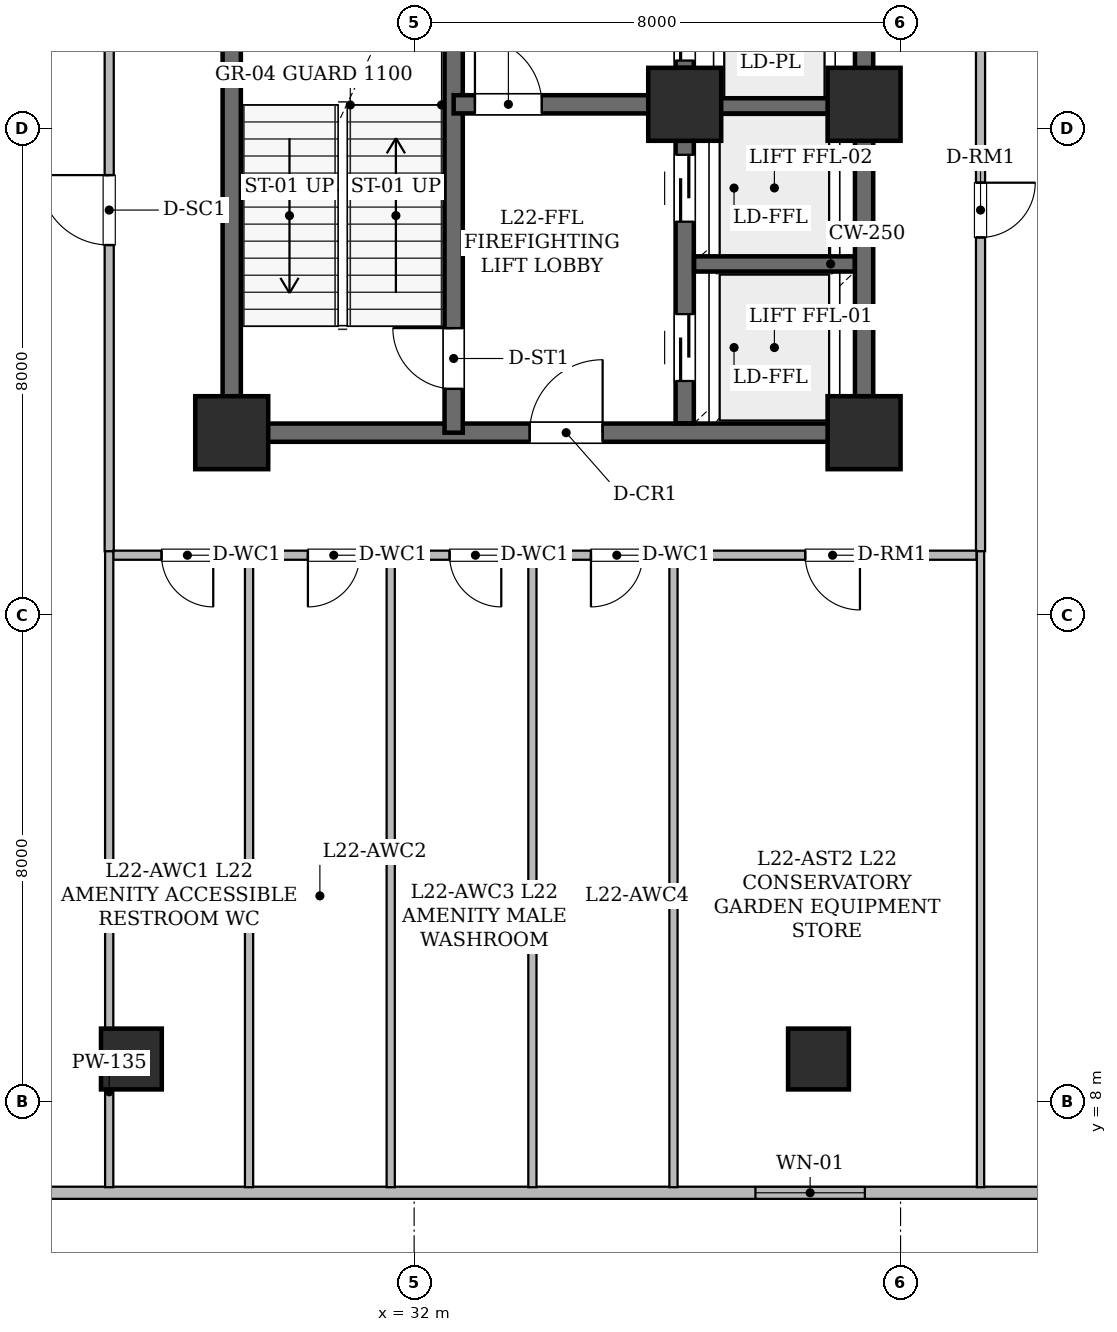
"""IFC4 building model, lengths in metres.
Left out: names, types, materials, properties, quantities, classifications, styles, units other than length and angle.
Written with IfcOpenShell. Run it as: python <this file> out.ifc"""

import sys

from ifc_helpers import new_model, si_unit, direction, frame, frame_2d, origin, origin_2d, place, context, subcontext, project, spatial, rectangle, hollow_rectangle, extrude, element, fill, save


model = new_model("IFC4")
c1 = context("Model", 3, precision=1e-05, world=origin(), true_north=direction((0.0, 1.0)))
c2 = subcontext(c1, "Body", "Model", "MODEL_VIEW")
j1 = project(units=[si_unit("LENGTHUNIT", "METRE"), si_unit("PLANEANGLEUNIT", "RADIAN")], contexts=[c1])
p1 = place(None, origin())
s1 = spatial("IfcSite", under=j1, at=p1, CompositionType="ELEMENT")
p2 = place(p1, origin())
s2 = spatial("IfcBuilding", under=s1, at=p2, CompositionType="ELEMENT")
p3 = place(p2, frame((0.0, 0.0, 89.8)))
s3 = spatial("IfcBuildingStorey", under=s2, at=p3, CompositionType="ELEMENT", Elevation=89.8)
for number, where, z_axis, x_axis in (
    (1, (29.0, 19.0, 0.0), (0.0, 0.0, 1.0), (1.0, 0.0, 0.0)),
    (2, (39.4, 19.0, 0.0), (0.0, 0.0, 1.0), (1.0, 0.0, 0.0)),
    (3, (36.45, 24.4, 0.0), (0.0, 0.0, 1.0), (1.0, 0.0, 0.0)),
    (4, (39.4, 24.4, 0.0), (0.0, 0.0, 1.0), (1.0, 0.0, 0.0)),
):
    element("IfcColumn", number, at=place(p3, frame(where, z_axis=z_axis, x_axis=x_axis)), inside=s3, PredefinedType="COLUMN", context=c2, shape_type="SweptSolid", body=[
        extrude(hollow_rectangle(XDim=1.2, YDim=1.2, WallThickness=0.06, at=origin_2d()), origin(), (0.0, 0.0, 1.0), 4.8),
    ])
for number, where, z_axis, x_axis in (
    (5, (27.35, 8.7, 0.025), (0.0, 0.0, 1.0), (1.0, 0.0, 0.0)),
    (6, (38.65, 8.7, 0.025), (0.0, 0.0, 1.0), (1.0, 0.0, 0.0)),
):
    element("IfcColumn", number, at=place(p3, frame(where, z_axis=z_axis, x_axis=x_axis)), inside=s3, PredefinedType="COLUMN", context=c2, shape_type="SweptSolid", body=[
        extrude(hollow_rectangle(XDim=1.0, YDim=1.0, WallThickness=0.05, at=origin_2d()), origin(), (0.0, 0.0, 1.0), 4.775),
    ])
p4 = place(p3, frame((52.296, 6.5, 0.0), z_axis=(0.0, 0.0, 1.0), x_axis=(-1.0, 0.0, 0.0)))
e7 = element("IfcWall", 7, at=p4, inside=s3, PredefinedType="STANDARD", context=c2, shape_type="SweptSolid", body=[
    extrude(rectangle(XDim=38.593, YDim=0.2, at=frame_2d((19.296, 0.0))), origin(), (0.0, 0.0, 1.0), 4.58),
])
p5 = place(p4, frame((12.883, 0.0, 0.9)))
e8 = element("IfcOpeningElement", 8, at=p5, cuts=e7, PredefinedType="OPENING", context=c2, shape_type="SweptSolid", body=[
    extrude(rectangle(XDim=1.8, YDim=1.6, at=frame_2d((0.9, 0.8))), frame((0.0, 0.11, 0.0), z_axis=(0.0, -1.0, 0.0), x_axis=(1.0, 0.0, 0.0)), (0.0, 0.0, 1.0), 0.22),
])
p6 = place(p3, frame((29.0, 19.0, 0.0), z_axis=(0.0, 0.0, 1.0), x_axis=(0.0, 1.0, 0.0)))
e9 = element("IfcWall", 9, at=p6, inside=s3, PredefinedType="SHEAR", context=c2, shape_type="SweptSolid", body=[
    extrude(rectangle(XDim=9.0, YDim=0.3, at=frame_2d((4.5, 0.0))), origin(), (0.0, 0.0, 1.0), 4.58),
])
p7 = place(p3, frame((29.0, 19.0, 0.0), z_axis=(0.0, 0.0, 1.0), x_axis=(1.0, 0.0, 0.0)))
e10 = element("IfcWall", 10, at=p7, inside=s3, PredefinedType="SHEAR", context=c2, shape_type="SweptSolid", body=[
    extrude(rectangle(XDim=10.4, YDim=0.3, at=frame_2d((5.2, 0.0))), origin(), (0.0, 0.0, 1.0), 4.58),
])
p8 = place(p7, frame((4.9, 0.0, 0.0)))
e11 = element("IfcOpeningElement", 11, at=p8, cuts=e10, PredefinedType="OPENING", context=c2, shape_type="SweptSolid", body=[
    extrude(rectangle(XDim=1.2, YDim=2.15, at=frame_2d((0.6, 1.075))), frame((0.0, 0.16, 0.0), z_axis=(0.0, -1.0, 0.0), x_axis=(1.0, 0.0, 0.0)), (0.0, 0.0, 1.0), 0.32),
])
p9 = place(p3, frame((39.4, 19.0, 0.0), z_axis=(0.0, 0.0, 1.0), x_axis=(0.0, 1.0, 0.0)))
e12 = element("IfcWall", 12, at=p9, inside=s3, PredefinedType="SHEAR", context=c2, shape_type="SweptSolid", body=[
    extrude(rectangle(XDim=5.4, YDim=0.3, at=frame_2d((2.7, 0.0))), origin(), (0.0, 0.0, 1.0), 4.58),
])
p10 = place(p3, frame((39.4, 24.4, 0.0), z_axis=(0.0, 0.0, 1.0), x_axis=(0.0, 1.0, 0.0)))
e13 = element("IfcWall", 13, at=p10, inside=s3, PredefinedType="SHEAR", context=c2, shape_type="SweptSolid", body=[
    extrude(rectangle(XDim=12.6, YDim=0.3, at=frame_2d((6.3, 0.0))), origin(), (0.0, 0.0, 1.0), 4.58),
])
p11 = place(p3, frame((32.65, 19.0, 0.0), z_axis=(0.0, 0.0, 1.0), x_axis=(0.0, 1.0, 0.0)))
e14 = element("IfcWall", 14, at=p11, inside=s3, PredefinedType="SHEAR", context=c2, shape_type="SweptSolid", body=[
    extrude(rectangle(XDim=9.0, YDim=0.3, at=frame_2d((4.5, 0.0))), origin(), (0.0, 0.0, 1.0), 4.58),
])
p12 = place(p11, frame((0.72, 0.0, 0.0)))
e15 = element("IfcOpeningElement", 15, at=p12, cuts=e14, PredefinedType="OPENING", context=c2, shape_type="SweptSolid", body=[
    extrude(rectangle(XDim=1.0, YDim=2.15, at=frame_2d((0.5, 1.075))), frame((0.0, 0.16, 0.0), z_axis=(0.0, -1.0, 0.0), x_axis=(1.0, 0.0, 0.0)), (0.0, 0.0, 1.0), 0.32),
])
p13 = place(p3, frame((32.65, 24.4, 0.0), z_axis=(0.0, 0.0, 1.0), x_axis=(1.0, 0.0, 0.0)))
e16 = element("IfcWall", 16, at=p13, inside=s3, PredefinedType="SHEAR", context=c2, shape_type="SweptSolid", body=[
    extrude(rectangle(XDim=3.8, YDim=0.3, at=frame_2d((1.9, 0.0))), origin(), (0.0, 0.0, 1.0), 4.58),
])
p14 = place(p13, frame((0.35, 0.0, 0.0)))
e17 = element("IfcOpeningElement", 17, at=p14, cuts=e16, PredefinedType="OPENING", context=c2, shape_type="SweptSolid", body=[
    extrude(rectangle(XDim=1.1, YDim=2.15, at=frame_2d((0.55, 1.075))), frame((0.0, 0.16, 0.0), z_axis=(0.0, -1.0, 0.0), x_axis=(1.0, 0.0, 0.0)), (0.0, 0.0, 1.0), 0.32),
])
p15 = place(p3, frame((36.45, 19.154, 0.0), z_axis=(0.0, 0.0, 1.0), x_axis=(0.0, 1.0, 0.0)))
e18 = element("IfcWall", 18, at=p15, inside=s3, PredefinedType="SHEAR", context=c2, shape_type="SweptSolid", body=[
    extrude(rectangle(XDim=4.646, YDim=0.3, at=frame_2d((2.323, 0.0))), origin(), (0.0, 0.0, 1.0), 4.58),
])
p16 = place(p15, frame((0.696, 0.0, 0.0)))
e19 = element("IfcOpeningElement", 19, at=p16, cuts=e18, PredefinedType="OPENING", context=c2, shape_type="SweptSolid", body=[
    extrude(rectangle(XDim=1.1, YDim=2.15, at=frame_2d((0.55, 1.075))), frame((0.0, 0.16, 0.0), z_axis=(0.0, -1.0, 0.0), x_axis=(1.0, 0.0, 0.0)), (0.0, 0.0, 1.0), 0.32),
])
p17 = place(p15, frame((3.316, 0.0, 0.0)))
e20 = element("IfcOpeningElement", 20, at=p17, cuts=e18, PredefinedType="OPENING", context=c2, shape_type="SweptSolid", body=[
    extrude(rectangle(XDim=1.1, YDim=2.15, at=frame_2d((0.55, 1.075))), frame((0.0, 0.16, 0.0), z_axis=(0.0, -1.0, 0.0), x_axis=(1.0, 0.0, 0.0)), (0.0, 0.0, 1.0), 0.32),
])
p18 = place(p3, frame((36.45, 25.0, 0.0), z_axis=(0.0, 0.0, 1.0), x_axis=(0.0, 1.0, 0.0)))
e21 = element("IfcWall", 21, at=p18, inside=s3, PredefinedType="SHEAR", context=c2, shape_type="SweptSolid", body=[
    extrude(rectangle(XDim=5.15, YDim=0.3, at=frame_2d((2.575, 0.0))), origin(), (0.0, 0.0, 1.0), 4.58),
])
p19 = place(p18, frame((0.12, 0.0, 0.0)))
e22 = element("IfcOpeningElement", 22, at=p19, cuts=e21, PredefinedType="OPENING", context=c2, shape_type="SweptSolid", body=[
    extrude(rectangle(XDim=1.05, YDim=2.15, at=frame_2d((0.525, 1.075))), frame((0.0, 0.16, 0.0), z_axis=(0.0, -1.0, 0.0), x_axis=(1.0, 0.0, 0.0)), (0.0, 0.0, 1.0), 0.32),
])
p20 = place(p18, frame((2.095, 0.0, 0.0)))
e23 = element("IfcOpeningElement", 23, at=p20, cuts=e21, PredefinedType="OPENING", context=c2, shape_type="SweptSolid", body=[
    extrude(rectangle(XDim=1.05, YDim=2.15, at=frame_2d((0.525, 1.075))), frame((0.0, 0.16, 0.0), z_axis=(0.0, -1.0, 0.0), x_axis=(1.0, 0.0, 0.0)), (0.0, 0.0, 1.0), 0.32),
])
p21 = place(p18, frame((3.98, 0.0, 0.0)))
e24 = element("IfcOpeningElement", 24, at=p21, cuts=e21, PredefinedType="OPENING", context=c2, shape_type="SweptSolid", body=[
    extrude(rectangle(XDim=1.05, YDim=2.15, at=frame_2d((0.525, 1.075))), frame((0.0, 0.16, 0.0), z_axis=(0.0, -1.0, 0.0), x_axis=(1.0, 0.0, 0.0)), (0.0, 0.0, 1.0), 0.32),
])
for number, where, z_axis, x_axis in (
    (25, (36.604, 21.775, 0.0), (0.0, 0.0, 1.0), (1.0, 0.0, 0.0)),
    (26, (36.604, 24.375, 0.0), (0.0, 0.0, 1.0), (1.0, 0.0, 0.0)),
):
    element("IfcWall", number, at=place(p3, frame(where, z_axis=z_axis, x_axis=x_axis)), inside=s3, PredefinedType="SHEAR", context=c2, shape_type="SweptSolid", body=[
        extrude(rectangle(XDim=2.642, YDim=0.25, at=frame_2d((1.321, 0.0))), origin(), (0.0, 0.0, 1.0), 4.58),
    ])
p22 = place(p3, frame((41.315, 28.314, 0.0), z_axis=(0.0, 0.0, 1.0), x_axis=(0.0, -1.0, 0.0)))
e27 = element("IfcWall", 27, at=p22, inside=s3, PredefinedType="STANDARD", context=c2, shape_type="SweptSolid", body=[
    extrude(rectangle(XDim=11.264, YDim=0.15, at=frame_2d((5.632, 0.0))), origin(), (0.0, 0.0, 1.0), 3.797),
])
p23 = place(p22, frame((5.203, 0.0, 0.0)))
e28 = element("IfcOpeningElement", 28, at=p23, cuts=e27, PredefinedType="OPENING", context=c2, shape_type="SweptSolid", body=[
    extrude(rectangle(XDim=0.9, YDim=2.1, at=frame_2d((0.45, 1.05))), frame((0.0, 0.085, 0.0), z_axis=(0.0, -1.0, 0.0), x_axis=(1.0, 0.0, 0.0)), (0.0, 0.0, 1.0), 0.17),
])
p24 = place(p3, frame((26.985, 17.05, 0.0), z_axis=(0.0, 0.0, 1.0), x_axis=(0.0, 1.0, 0.0)))
e29 = element("IfcWall", 29, at=p24, inside=s3, PredefinedType="STANDARD", context=c2, shape_type="SweptSolid", body=[
    extrude(rectangle(XDim=11.264, YDim=0.15, at=frame_2d((5.632, 0.0))), origin(), (0.0, 0.0, 1.0), 3.797),
])
p25 = place(p24, frame((5.036, 0.0, 0.0)))
e30 = element("IfcOpeningElement", 30, at=p25, cuts=e29, PredefinedType="OPENING", context=c2, shape_type="SweptSolid", body=[
    extrude(rectangle(XDim=1.15, YDim=2.2, at=frame_2d((0.575, 1.1))), frame((0.0, 0.085, 0.0), z_axis=(0.0, -1.0, 0.0), x_axis=(1.0, 0.0, 0.0)), (0.0, 0.0, 1.0), 0.17),
])
p26 = place(p3, frame((29.534, 16.985, 0.0), z_axis=(0.0, 0.0, 1.0), x_axis=(-1.0, 0.0, 0.0)))
e31 = element("IfcWall", 31, at=p26, inside=s3, PredefinedType="STANDARD", context=c2, shape_type="SweptSolid", body=[
    extrude(rectangle(XDim=2.484, YDim=0.15, at=frame_2d((1.242, 0.0))), origin(), (0.0, 0.0, 1.0), 3.797),
])
p27 = place(p26, frame((0.838, 0.0, 0.0)))
e32 = element("IfcOpeningElement", 32, at=p27, cuts=e31, PredefinedType="OPENING", context=c2, shape_type="SweptSolid", body=[
    extrude(rectangle(XDim=0.85, YDim=2.1, at=frame_2d((0.425, 1.05))), frame((0.0, 0.085, 0.0), z_axis=(0.0, -1.0, 0.0), x_axis=(1.0, 0.0, 0.0)), (0.0, 0.0, 1.0), 0.17),
])
p28 = place(p3, frame((31.864, 16.985, 0.0), z_axis=(0.0, 0.0, 1.0), x_axis=(-1.0, 0.0, 0.0)))
e33 = element("IfcWall", 33, at=p28, inside=s3, PredefinedType="STANDARD", context=c2, shape_type="SweptSolid", body=[
    extrude(rectangle(XDim=2.33, YDim=0.15, at=frame_2d((1.165, 0.0))), origin(), (0.0, 0.0, 1.0), 4.58),
])
p29 = place(p28, frame((0.761, 0.0, 0.0)))
e34 = element("IfcOpeningElement", 34, at=p29, cuts=e33, PredefinedType="OPENING", context=c2, shape_type="SweptSolid", body=[
    extrude(rectangle(XDim=0.85, YDim=2.1, at=frame_2d((0.425, 1.05))), frame((0.0, 0.085, 0.0), z_axis=(0.0, -1.0, 0.0), x_axis=(1.0, 0.0, 0.0)), (0.0, 0.0, 1.0), 0.17),
])
p30 = place(p3, frame((34.194, 16.985, 0.0), z_axis=(0.0, 0.0, 1.0), x_axis=(-1.0, 0.0, 0.0)))
e35 = element("IfcWall", 35, at=p30, inside=s3, PredefinedType="STANDARD", context=c2, shape_type="SweptSolid", body=[
    extrude(rectangle(XDim=2.33, YDim=0.15, at=frame_2d((1.165, 0.0))), origin(), (0.0, 0.0, 1.0), 4.58),
])
p31 = place(p30, frame((0.761, 0.0, 0.0)))
e36 = element("IfcOpeningElement", 36, at=p31, cuts=e35, PredefinedType="OPENING", context=c2, shape_type="SweptSolid", body=[
    extrude(rectangle(XDim=0.85, YDim=2.1, at=frame_2d((0.425, 1.05))), frame((0.0, 0.085, 0.0), z_axis=(0.0, -1.0, 0.0), x_axis=(1.0, 0.0, 0.0)), (0.0, 0.0, 1.0), 0.17),
])
p32 = place(p3, frame((36.514, 16.985, 0.0), z_axis=(0.0, 0.0, 1.0), x_axis=(-1.0, 0.0, 0.0)))
e37 = element("IfcWall", 37, at=p32, inside=s3, PredefinedType="STANDARD", context=c2, shape_type="SweptSolid", body=[
    extrude(rectangle(XDim=2.32, YDim=0.15, at=frame_2d((1.16, 0.0))), origin(), (0.0, 0.0, 1.0), 4.58),
])
p33 = place(p32, frame((0.756, 0.0, 0.0)))
e38 = element("IfcOpeningElement", 38, at=p33, cuts=e37, PredefinedType="OPENING", context=c2, shape_type="SweptSolid", body=[
    extrude(rectangle(XDim=0.85, YDim=2.1, at=frame_2d((0.425, 1.05))), frame((0.0, 0.085, 0.0), z_axis=(0.0, -1.0, 0.0), x_axis=(1.0, 0.0, 0.0)), (0.0, 0.0, 1.0), 0.17),
])
p34 = place(p3, frame((41.25, 16.985, 0.0), z_axis=(0.0, 0.0, 1.0), x_axis=(-1.0, 0.0, 0.0)))
e39 = element("IfcWall", 39, at=p34, inside=s3, PredefinedType="STANDARD", context=c2, shape_type="SweptSolid", body=[
    extrude(rectangle(XDim=4.736, YDim=0.15, at=frame_2d((2.368, 0.0))), origin(), (0.0, 0.0, 1.0), 3.797),
])
p35 = place(p34, frame((1.918, 0.0, 0.0)))
e40 = element("IfcOpeningElement", 40, at=p35, cuts=e39, PredefinedType="OPENING", context=c2, shape_type="SweptSolid", body=[
    extrude(rectangle(XDim=0.9, YDim=2.1, at=frame_2d((0.45, 1.05))), frame((0.0, 0.085, 0.0), z_axis=(0.0, -1.0, 0.0), x_axis=(1.0, 0.0, 0.0)), (0.0, 0.0, 1.0), 0.17),
])
p36 = place(p3, frame((41.315, 6.592, 0.0), z_axis=(0.0, 0.0, 1.0), x_axis=(0.0, 1.0, 0.0)))
e41 = element("IfcWall", 41, at=p36, inside=s3, PredefinedType="PARTITIONING", context=c2, shape_type="SweptSolid", body=[
    extrude(rectangle(XDim=10.458, YDim=0.12, at=frame_2d((5.229, 0.0))), origin(), (0.0, 0.0, 1.0), 4.026),
])
p37 = place(p3, frame((26.985, 17.05, 0.0), z_axis=(0.0, 0.0, 1.0), x_axis=(0.0, -1.0, 0.0)))
e42 = element("IfcWall", 42, at=p37, inside=s3, PredefinedType="PARTITIONING", context=c2, shape_type="SweptSolid", body=[
    extrude(rectangle(XDim=10.458, YDim=0.135, at=frame_2d((5.229, 0.0))), origin(), (0.0, 0.0, 1.0), 3.797),
])
for number, where, z_axis, x_axis in (
    (43, (29.285, 16.918, 0.0), (0.0, 0.0, 1.0), (0.0, -1.0, 0.0)),
    (44, (31.615, 16.918, 0.0), (0.0, 0.0, 1.0), (0.0, -1.0, 0.0)),
    (45, (33.945, 16.918, 0.0), (0.0, 0.0, 1.0), (0.0, -1.0, 0.0)),
    (46, (36.265, 16.918, 0.0), (0.0, 0.0, 1.0), (0.0, -1.0, 0.0)),
):
    element("IfcWall", number, at=place(p3, frame(where, z_axis=z_axis, x_axis=x_axis)), inside=s3, PredefinedType="PARTITIONING", context=c2, shape_type="SweptSolid", body=[
        extrude(rectangle(XDim=10.326, YDim=0.135, at=frame_2d((5.163, 0.0))), origin(), (0.0, 0.0, 1.0), 4.026),
    ])
p38 = place(p5, origin())
e47 = element("IfcWindow", 47, at=p38, inside=s3, PartitioningType="SINGLE_PANEL", PredefinedType="WINDOW", context=c2, shape_type="SweptSolid", body=[
    extrude(rectangle(XDim=1.8, YDim=1.6, at=frame_2d((0.9, 0.8))), frame((0.0, 0.03, 0.0), z_axis=(0.0, -1.0, 0.0), x_axis=(1.0, 0.0, 0.0)), (0.0, 0.0, 1.0), 0.06),
])
fill(e8, e47)
p39 = place(p12, origin())
e48 = element("IfcDoor", 48, at=p39, inside=s3, OperationType="SINGLE_SWING_RIGHT", PredefinedType="DOOR", context=c2, shape_type="SweptSolid", body=[
    extrude(rectangle(XDim=1.0, YDim=2.15, at=frame_2d((0.5, 1.075))), frame((0.0, 0.025, 0.0), z_axis=(0.0, -1.0, 0.0), x_axis=(1.0, 0.0, 0.0)), (0.0, 0.0, 1.0), 0.05),
])
fill(e15, e48)
p40 = place(p14, origin())
e49 = element("IfcDoor", 49, at=p40, inside=s3, OperationType="SINGLE_SWING_LEFT", PredefinedType="DOOR", context=c2, shape_type="SweptSolid", body=[
    extrude(rectangle(XDim=1.1, YDim=2.15, at=frame_2d((0.55, 1.075))), frame((0.0, 0.025, 0.0), z_axis=(0.0, -1.0, 0.0), x_axis=(1.0, 0.0, 0.0)), (0.0, 0.0, 1.0), 0.05),
])
fill(e17, e49)
p41 = place(p8, origin())
e50 = element("IfcDoor", 50, at=p41, inside=s3, OperationType="SINGLE_SWING_RIGHT", PredefinedType="DOOR", context=c2, shape_type="SweptSolid", body=[
    extrude(rectangle(XDim=1.2, YDim=2.15, at=frame_2d((0.6, 1.075))), frame((0.0, 0.025, 0.0), z_axis=(0.0, -1.0, 0.0), x_axis=(1.0, 0.0, 0.0)), (0.0, 0.0, 1.0), 0.05),
])
fill(e11, e50)
p42 = place(p16, origin())
e51 = element("IfcDoor", 51, at=p42, inside=s3, OperationType="SLIDING_TO_LEFT", PredefinedType="DOOR", context=c2, shape_type="SweptSolid", body=[
    extrude(rectangle(XDim=1.1, YDim=2.15, at=frame_2d((0.55, 1.075))), frame((0.0, 0.025, 0.0), z_axis=(0.0, -1.0, 0.0), x_axis=(1.0, 0.0, 0.0)), (0.0, 0.0, 1.0), 0.05),
])
fill(e19, e51)
p43 = place(p17, origin())
e52 = element("IfcDoor", 52, at=p43, inside=s3, OperationType="SLIDING_TO_LEFT", PredefinedType="DOOR", context=c2, shape_type="SweptSolid", body=[
    extrude(rectangle(XDim=1.1, YDim=2.15, at=frame_2d((0.55, 1.075))), frame((0.0, 0.025, 0.0), z_axis=(0.0, -1.0, 0.0), x_axis=(1.0, 0.0, 0.0)), (0.0, 0.0, 1.0), 0.05),
])
fill(e20, e52)
p44 = place(p19, origin())
e53 = element("IfcDoor", 53, at=p44, inside=s3, OperationType="SLIDING_TO_LEFT", PredefinedType="DOOR", context=c2, shape_type="SweptSolid", body=[
    extrude(rectangle(XDim=1.05, YDim=2.15, at=frame_2d((0.525, 1.075))), frame((0.0, 0.025, 0.0), z_axis=(0.0, -1.0, 0.0), x_axis=(1.0, 0.0, 0.0)), (0.0, 0.0, 1.0), 0.05),
])
fill(e22, e53)
p45 = place(p23, origin())
e54 = element("IfcDoor", 54, at=p45, inside=s3, OperationType="SINGLE_SWING_LEFT", PredefinedType="DOOR", context=c2, shape_type="SweptSolid", body=[
    extrude(rectangle(XDim=0.9, YDim=2.1, at=frame_2d((0.45, 1.05))), frame((0.0, 0.025, 0.0), z_axis=(0.0, -1.0, 0.0), x_axis=(1.0, 0.0, 0.0)), (0.0, 0.0, 1.0), 0.05),
])
fill(e28, e54)
p46 = place(p25, origin())
e55 = element("IfcDoor", 55, at=p46, inside=s3, OperationType="SINGLE_SWING_RIGHT", PredefinedType="DOOR", context=c2, shape_type="SweptSolid", body=[
    extrude(rectangle(XDim=1.15, YDim=2.2, at=frame_2d((0.575, 1.1))), frame((0.0, 0.025, 0.0), z_axis=(0.0, -1.0, 0.0), x_axis=(1.0, 0.0, 0.0)), (0.0, 0.0, 1.0), 0.05),
])
fill(e30, e55)
p47 = place(p27, origin())
e56 = element("IfcDoor", 56, at=p47, inside=s3, OperationType="SINGLE_SWING_LEFT", PredefinedType="DOOR", context=c2, shape_type="SweptSolid", body=[
    extrude(rectangle(XDim=0.85, YDim=2.1, at=frame_2d((0.425, 1.05))), frame((0.0, 0.025, 0.0), z_axis=(0.0, -1.0, 0.0), x_axis=(1.0, 0.0, 0.0)), (0.0, 0.0, 1.0), 0.05),
])
fill(e32, e56)
p48 = place(p29, origin())
e57 = element("IfcDoor", 57, at=p48, inside=s3, OperationType="SINGLE_SWING_RIGHT", PredefinedType="DOOR", context=c2, shape_type="SweptSolid", body=[
    extrude(rectangle(XDim=0.85, YDim=2.1, at=frame_2d((0.425, 1.05))), frame((0.0, 0.025, 0.0), z_axis=(0.0, -1.0, 0.0), x_axis=(1.0, 0.0, 0.0)), (0.0, 0.0, 1.0), 0.05),
])
fill(e34, e57)
p49 = place(p31, origin())
e58 = element("IfcDoor", 58, at=p49, inside=s3, OperationType="SINGLE_SWING_LEFT", PredefinedType="DOOR", context=c2, shape_type="SweptSolid", body=[
    extrude(rectangle(XDim=0.85, YDim=2.1, at=frame_2d((0.425, 1.05))), frame((0.0, 0.025, 0.0), z_axis=(0.0, -1.0, 0.0), x_axis=(1.0, 0.0, 0.0)), (0.0, 0.0, 1.0), 0.05),
])
fill(e36, e58)
p50 = place(p33, origin())
e59 = element("IfcDoor", 59, at=p50, inside=s3, OperationType="SINGLE_SWING_RIGHT", PredefinedType="DOOR", context=c2, shape_type="SweptSolid", body=[
    extrude(rectangle(XDim=0.85, YDim=2.1, at=frame_2d((0.425, 1.05))), frame((0.0, 0.025, 0.0), z_axis=(0.0, -1.0, 0.0), x_axis=(1.0, 0.0, 0.0)), (0.0, 0.0, 1.0), 0.05),
])
fill(e38, e59)
p51 = place(p35, origin())
e60 = element("IfcDoor", 60, at=p51, inside=s3, OperationType="SINGLE_SWING_LEFT", PredefinedType="DOOR", context=c2, shape_type="SweptSolid", body=[
    extrude(rectangle(XDim=0.9, YDim=2.1, at=frame_2d((0.45, 1.05))), frame((0.0, 0.025, 0.0), z_axis=(0.0, -1.0, 0.0), x_axis=(1.0, 0.0, 0.0)), (0.0, 0.0, 1.0), 0.05),
])
fill(e40, e60)
save(model, sys.argv[1])
